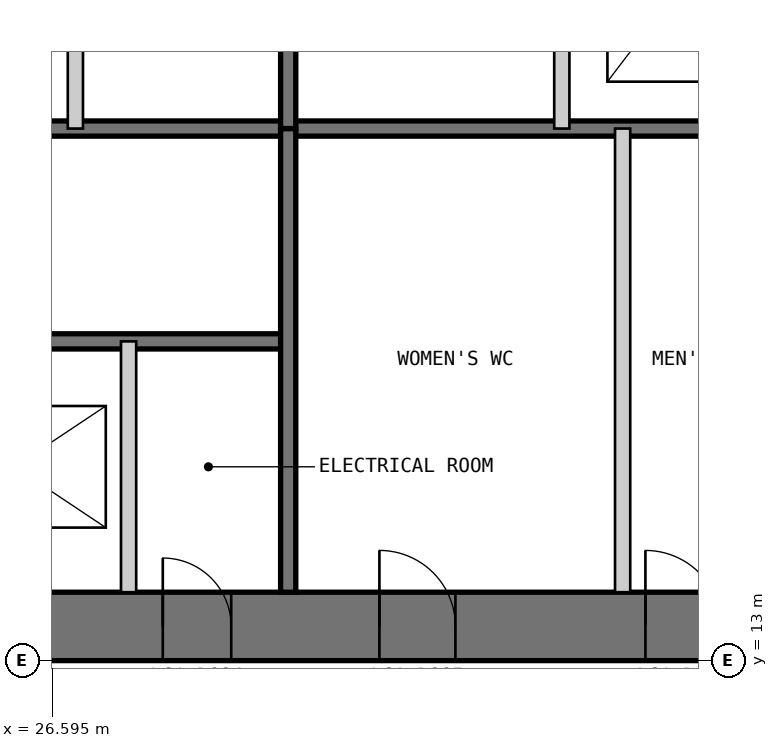
"""IFC4 building model, lengths in metres.
Left out: names, types, materials, properties, quantities, classifications, styles, units other than length and angle.
Written with IfcOpenShell. Run it as: python <this file> out.ifc"""

import sys

from ifc_helpers import new_model, si_unit, direction, frame, frame_2d, origin, place, context, subcontext, project, spatial, polyline, rectangle, outline, extrude, element, fill, save


model = new_model("IFC4")
c1 = context("Model", 3, precision=1e-05, world=origin(), true_north=direction((0.0, 1.0)))
c2 = subcontext(c1, "Body", "Model", "MODEL_VIEW")
j1 = project(units=[si_unit("LENGTHUNIT", "METRE"), si_unit("PLANEANGLEUNIT", "RADIAN")], contexts=[c1])
p1 = place(None, origin())
s1 = spatial("IfcSite", under=j1, at=p1, CompositionType="ELEMENT")
p2 = place(p1, origin())
s2 = spatial("IfcBuilding", under=s1, at=p2, CompositionType="ELEMENT")
p3 = place(p2, frame((0.0, 0.0, 259.4)))
s3 = spatial("IfcBuildingStorey", under=s2, at=p3, CompositionType="ELEMENT", Elevation=259.4)
p4 = place(p3, frame((13.0, 13.45, 0.0), z_axis=(0.0, 0.0, 1.0), x_axis=(1.0, 0.0, 0.0)))
e1 = element("IfcWall", 1, at=p4, inside=s3, PredefinedType="SHEAR", context=c2, shape_type="SweptSolid", body=[
    extrude(outline(polyline([(0.0, -0.45), (24.0, -0.45), (23.1, 0.45), (0.9, 0.45), (0.0, -0.45)])), origin(), (0.0, 0.0, 1.0), 3.4),
])
p5 = place(p4, frame((4.9, 0.0, 0.0)))
e2 = element("IfcOpeningElement", 2, at=p5, cuts=e1, PredefinedType="OPENING", context=c2, shape_type="SweptSolid", body=[
    extrude(rectangle(XDim=1.0, YDim=2.2, at=frame_2d((0.5, 1.1))), frame((0.0, 0.46, 0.0), z_axis=(0.0, -1.0, 0.0), x_axis=(1.0, 0.0, 0.0)), (0.0, 0.0, 1.0), 0.92),
])
p6 = place(p4, frame((8.9, 0.0, 0.0)))
e3 = element("IfcOpeningElement", 3, at=p6, cuts=e1, PredefinedType="OPENING", context=c2, shape_type="SweptSolid", body=[
    extrude(rectangle(XDim=1.1, YDim=2.2, at=frame_2d((0.55, 1.1))), frame((0.0, 0.46, 0.0), z_axis=(0.0, -1.0, 0.0), x_axis=(1.0, 0.0, 0.0)), (0.0, 0.0, 1.0), 0.92),
])
p7 = place(p4, frame((15.05, 0.0, 0.0)))
e4 = element("IfcOpeningElement", 4, at=p7, cuts=e1, PredefinedType="OPENING", context=c2, shape_type="SweptSolid", body=[
    extrude(rectangle(XDim=0.9, YDim=2.2, at=frame_2d((0.45, 1.1))), frame((0.0, 0.46, 0.0), z_axis=(0.0, -1.0, 0.0), x_axis=(1.0, 0.0, 0.0)), (0.0, 0.0, 1.0), 0.92),
])
p8 = place(p4, frame((17.9, 0.0, 0.0)))
e5 = element("IfcOpeningElement", 5, at=p8, cuts=e1, PredefinedType="OPENING", context=c2, shape_type="SweptSolid", body=[
    extrude(rectangle(XDim=1.0, YDim=2.2, at=frame_2d((0.5, 1.1))), frame((0.0, 0.46, 0.0), z_axis=(0.0, -1.0, 0.0), x_axis=(1.0, 0.0, 0.0)), (0.0, 0.0, 1.0), 0.92),
])
p9 = place(p4, frame((21.4, 0.0, 0.0)))
e6 = element("IfcOpeningElement", 6, at=p9, cuts=e1, PredefinedType="OPENING", context=c2, shape_type="SweptSolid", body=[
    extrude(rectangle(XDim=1.0, YDim=2.2, at=frame_2d((0.5, 1.1))), frame((0.0, 0.46, 0.0), z_axis=(0.0, -1.0, 0.0), x_axis=(1.0, 0.0, 0.0)), (0.0, 0.0, 1.0), 0.92),
])
p10 = place(p3, frame((20.3, 17.2, 0.0), z_axis=(0.0, 0.0, 1.0), x_axis=(1.0, 0.0, 0.0)))
e7 = element("IfcWall", 7, at=p10, inside=s3, PredefinedType="SOLIDWALL", context=c2, shape_type="SweptSolid", body=[
    extrude(rectangle(XDim=9.4, YDim=0.2, at=frame_2d((4.7, 0.0))), origin(), (0.0, 0.0, 1.0), 3.2),
])
p11 = place(p10, frame((0.25, 0.0, 0.0)))
e8 = element("IfcOpeningElement", 8, at=p11, cuts=e7, PredefinedType="OPENING", context=c2, shape_type="SweptSolid", body=[
    extrude(rectangle(XDim=1.0, YDim=2.2, at=frame_2d((0.5, 1.1))), frame((0.0, 0.11, 0.0), z_axis=(0.0, -1.0, 0.0), x_axis=(1.0, 0.0, 0.0)), (0.0, 0.0, 1.0), 0.22),
])
p12 = place(p3, frame((20.3, 20.0, 0.0), z_axis=(0.0, 0.0, 1.0), x_axis=(1.0, 0.0, 0.0)))
e9 = element("IfcWall", 9, at=p12, inside=s3, PredefinedType="SOLIDWALL", context=c2, shape_type="SweptSolid", body=[
    extrude(rectangle(XDim=15.8, YDim=0.2, at=frame_2d((7.9, 0.0))), origin(), (0.0, 0.0, 1.0), 3.2),
])
p13 = place(p3, frame((27.6, 13.9, 0.0), z_axis=(0.0, 0.0, 1.0), x_axis=(0.0, 1.0, 0.0)))
e10 = element("IfcWall", 10, at=p13, inside=s3, PredefinedType="PARTITIONING", context=c2, shape_type="SweptSolid", body=[
    extrude(rectangle(XDim=3.3, YDim=0.2, at=frame_2d((1.65, 0.0))), origin(), (0.0, 0.0, 1.0), 3.2),
])
p14 = place(p3, frame((29.7, 13.9, 0.0), z_axis=(0.0, 0.0, 1.0), x_axis=(0.0, 1.0, 0.0)))
e11 = element("IfcWall", 11, at=p14, inside=s3, PredefinedType="SOLIDWALL", context=c2, shape_type="SweptSolid", body=[
    extrude(rectangle(XDim=6.1, YDim=0.2, at=frame_2d((3.05, 0.0))), origin(), (0.0, 0.0, 1.0), 3.2),
])
p15 = place(p3, frame((34.1, 13.9, 0.0), z_axis=(0.0, 0.0, 1.0), x_axis=(0.0, 1.0, 0.0)))
e12 = element("IfcWall", 12, at=p15, inside=s3, PredefinedType="PARTITIONING", context=c2, shape_type="SweptSolid", body=[
    extrude(rectangle(XDim=6.1, YDim=0.2, at=frame_2d((3.05, 0.0))), origin(), (0.0, 0.0, 1.0), 3.2),
])
p16 = place(p3, frame((33.3, 36.1, 0.0), z_axis=(0.0, 0.0, 1.0), x_axis=(0.0, -1.0, 0.0)))
e13 = element("IfcWall", 13, at=p16, inside=s3, PredefinedType="PARTITIONING", context=c2, shape_type="SweptSolid", body=[
    extrude(rectangle(XDim=16.1, YDim=0.2, at=frame_2d((8.05, 0.0))), origin(), (0.0, 0.0, 1.0), 3.2),
])
p17 = place(p16, frame((4.1, 0.0, 0.0)))
e14 = element("IfcOpeningElement", 14, at=p17, cuts=e13, PredefinedType="OPENING", context=c2, shape_type="SweptSolid", body=[
    extrude(rectangle(XDim=0.9, YDim=2.2, at=frame_2d((0.45, 1.1))), frame((0.0, 0.11, 0.0), z_axis=(0.0, -1.0, 0.0), x_axis=(1.0, 0.0, 0.0)), (0.0, 0.0, 1.0), 0.22),
])
p18 = place(p16, frame((7.217, 0.0, 0.0)))
e15 = element("IfcOpeningElement", 15, at=p18, cuts=e13, PredefinedType="OPENING", context=c2, shape_type="SweptSolid", body=[
    extrude(rectangle(XDim=1.1, YDim=2.2, at=frame_2d((0.55, 1.1))), frame((0.0, 0.11, 0.0), z_axis=(0.0, -1.0, 0.0), x_axis=(1.0, 0.0, 0.0)), (0.0, 0.0, 1.0), 0.22),
])
p19 = place(p16, frame((10.55, 0.0, 0.0)))
e16 = element("IfcOpeningElement", 16, at=p19, cuts=e13, PredefinedType="OPENING", context=c2, shape_type="SweptSolid", body=[
    extrude(rectangle(XDim=1.1, YDim=2.2, at=frame_2d((0.55, 1.1))), frame((0.0, 0.11, 0.0), z_axis=(0.0, -1.0, 0.0), x_axis=(1.0, 0.0, 0.0)), (0.0, 0.0, 1.0), 0.22),
])
p20 = place(p16, frame((13.883, 0.0, 0.0)))
e17 = element("IfcOpeningElement", 17, at=p20, cuts=e13, PredefinedType="OPENING", context=c2, shape_type="SweptSolid", body=[
    extrude(rectangle(XDim=1.1, YDim=2.2, at=frame_2d((0.55, 1.1))), frame((0.0, 0.11, 0.0), z_axis=(0.0, -1.0, 0.0), x_axis=(1.0, 0.0, 0.0)), (0.0, 0.0, 1.0), 0.22),
])
p21 = place(p3, frame((29.7, 36.1, 0.0), z_axis=(0.0, 0.0, 1.0), x_axis=(0.0, -1.0, 0.0)))
e18 = element("IfcWall", 18, at=p21, inside=s3, PredefinedType="SOLIDWALL", context=c2, shape_type="SweptSolid", body=[
    extrude(rectangle(XDim=16.1, YDim=0.2, at=frame_2d((8.05, 0.0))), origin(), (0.0, 0.0, 1.0), 3.2),
])
p22 = place(p21, frame((6.65, 0.0, 0.0)))
e19 = element("IfcOpeningElement", 19, at=p22, cuts=e18, PredefinedType="OPENING", context=c2, shape_type="SweptSolid", body=[
    extrude(rectangle(XDim=0.9, YDim=2.2, at=frame_2d((0.45, 1.1))), frame((0.0, 0.11, 0.0), z_axis=(0.0, -1.0, 0.0), x_axis=(1.0, 0.0, 0.0)), (0.0, 0.0, 1.0), 0.22),
])
p23 = place(p21, frame((9.35, 0.0, 0.0)))
e20 = element("IfcOpeningElement", 20, at=p23, cuts=e18, PredefinedType="OPENING", context=c2, shape_type="SweptSolid", body=[
    extrude(rectangle(XDim=0.9, YDim=2.2, at=frame_2d((0.45, 1.1))), frame((0.0, 0.11, 0.0), z_axis=(0.0, -1.0, 0.0), x_axis=(1.0, 0.0, 0.0)), (0.0, 0.0, 1.0), 0.22),
])
p24 = place(p21, frame((13.35, 0.0, 0.0)))
e21 = element("IfcOpeningElement", 21, at=p24, cuts=e18, PredefinedType="OPENING", context=c2, shape_type="SweptSolid", body=[
    extrude(rectangle(XDim=0.9, YDim=2.2, at=frame_2d((0.45, 1.1))), frame((0.0, 0.11, 0.0), z_axis=(0.0, -1.0, 0.0), x_axis=(1.0, 0.0, 0.0)), (0.0, 0.0, 1.0), 0.22),
])
p25 = place(p3, frame((26.9, 30.0, 0.0), z_axis=(0.0, 0.0, 1.0), x_axis=(0.0, -1.0, 0.0)))
e22 = element("IfcWall", 22, at=p25, inside=s3, PredefinedType="PARTITIONING", context=c2, shape_type="SweptSolid", body=[
    extrude(rectangle(XDim=10.0, YDim=0.2, at=frame_2d((5.0, 0.0))), origin(), (0.0, 0.0, 1.0), 3.2),
])
p26 = place(p7, origin())
e23 = element("IfcDoor", 23, at=p26, inside=s3, OperationType="SINGLE_SWING_LEFT", PredefinedType="DOOR", context=c2, shape_type="SweptSolid", body=[
    extrude(rectangle(XDim=0.9, YDim=2.2, at=frame_2d((0.45, 1.1))), frame((0.0, 0.025, 0.0), z_axis=(0.0, -1.0, 0.0), x_axis=(1.0, 0.0, 0.0)), (0.0, 0.0, 1.0), 0.05),
    extrude(outline(polyline([(0.0, 0.0), (0.04, 0.0), (0.04, 2.16), (0.86, 2.16), (0.86, 0.0), (0.9, 0.0), (0.9, 2.2), (0.0, 2.2), (0.0, 0.0)])), frame((0.0, 0.3, 0.0), z_axis=(0.0, -1.0, 0.0), x_axis=(1.0, 0.0, 0.0)), (0.0, 0.0, 1.0), 0.6),
])
fill(e4, e23)
p27 = place(p8, origin())
e24 = element("IfcDoor", 24, at=p27, inside=s3, OperationType="SINGLE_SWING_LEFT", PredefinedType="DOOR", context=c2, shape_type="SweptSolid", body=[
    extrude(rectangle(XDim=1.0, YDim=2.2, at=frame_2d((0.5, 1.1))), frame((0.0, 0.025, 0.0), z_axis=(0.0, -1.0, 0.0), x_axis=(1.0, 0.0, 0.0)), (0.0, 0.0, 1.0), 0.05),
    extrude(outline(polyline([(0.0, 0.0), (0.04, 0.0), (0.04, 2.16), (0.96, 2.16), (0.96, 0.0), (1.0, 0.0), (1.0, 2.2), (0.0, 2.2), (0.0, 0.0)])), frame((0.0, 0.3, 0.0), z_axis=(0.0, -1.0, 0.0), x_axis=(1.0, 0.0, 0.0)), (0.0, 0.0, 1.0), 0.6),
])
fill(e5, e24)
p28 = place(p9, origin())
e25 = element("IfcDoor", 25, at=p28, inside=s3, OperationType="SINGLE_SWING_LEFT", PredefinedType="DOOR", context=c2, shape_type="SweptSolid", body=[
    extrude(rectangle(XDim=1.0, YDim=2.2, at=frame_2d((0.5, 1.1))), frame((0.0, 0.025, 0.0), z_axis=(0.0, -1.0, 0.0), x_axis=(1.0, 0.0, 0.0)), (0.0, 0.0, 1.0), 0.05),
    extrude(outline(polyline([(0.0, 0.0), (0.04, 0.0), (0.04, 2.16), (0.96, 2.16), (0.96, 0.0), (1.0, 0.0), (1.0, 2.2), (0.0, 2.2), (0.0, 0.0)])), frame((0.0, 0.3, 0.0), z_axis=(0.0, -1.0, 0.0), x_axis=(1.0, 0.0, 0.0)), (0.0, 0.0, 1.0), 0.6),
])
fill(e6, e25)
save(model, sys.argv[1])
